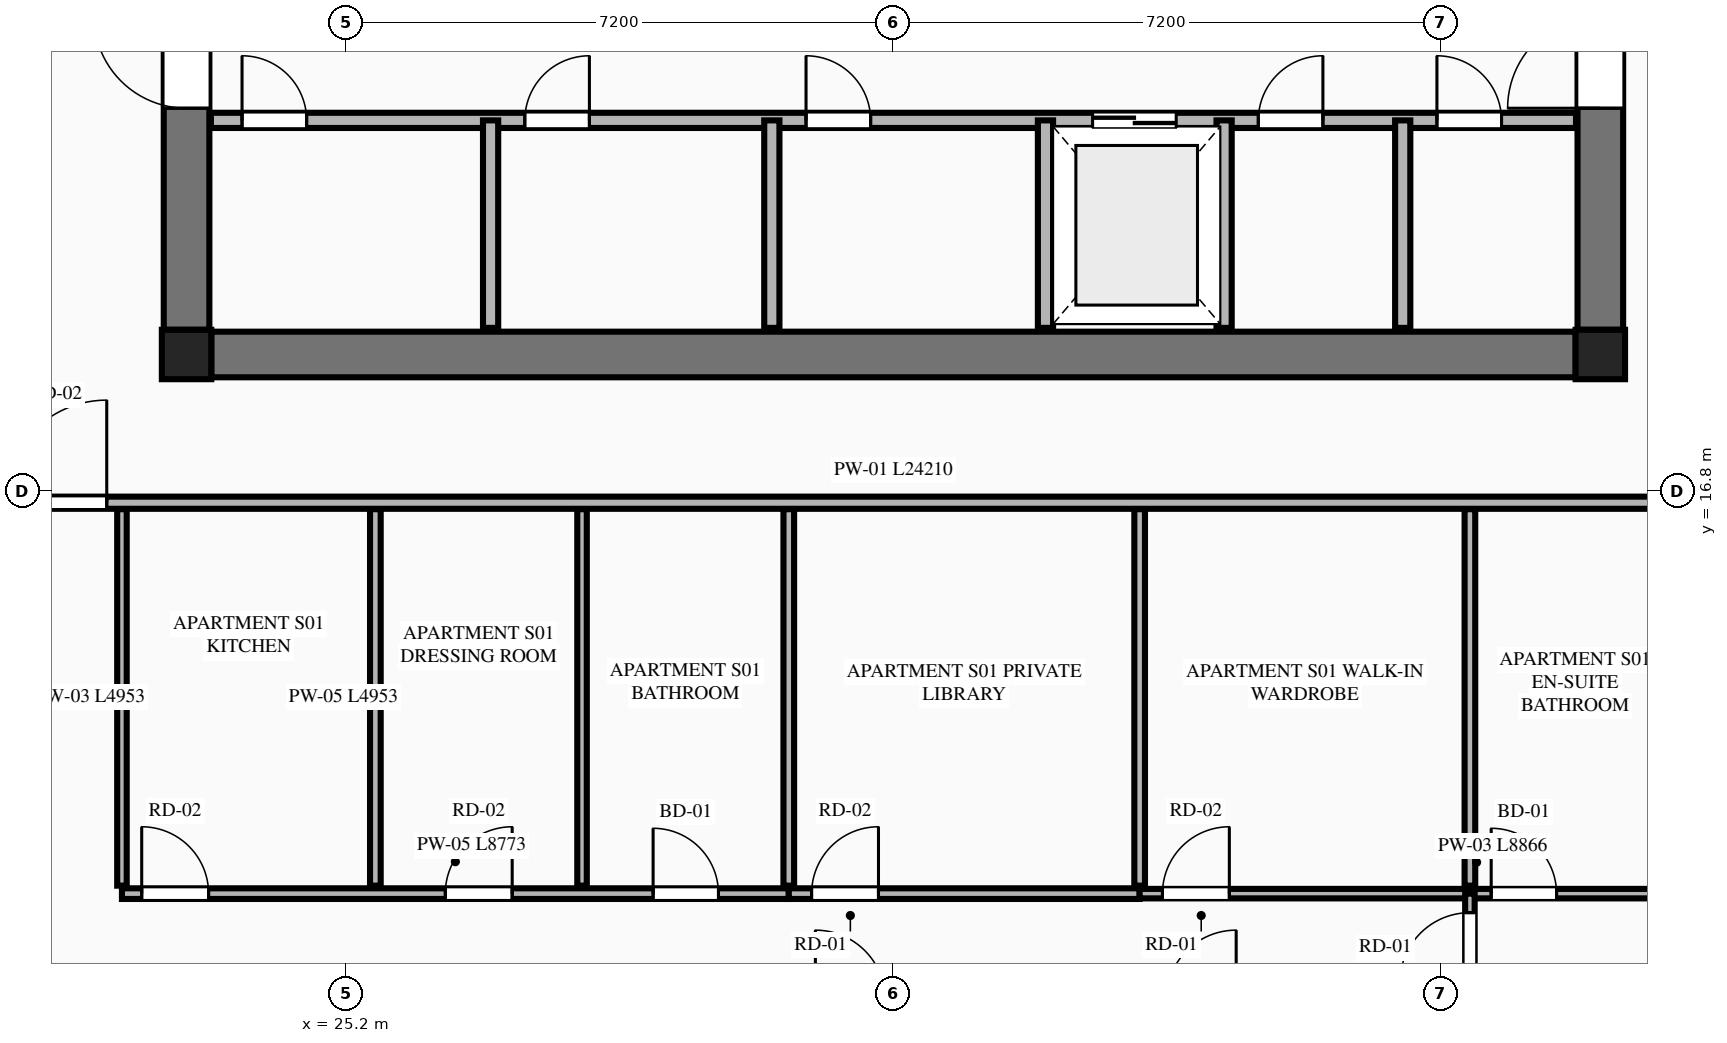
"""IFC4 building model, lengths in metres.
Left out: names, types, materials, properties, quantities, classifications, styles, units other than length and angle.
Written with IfcOpenShell. Run it as: python <this file> out.ifc"""

import sys

from ifc_helpers import new_model, si_unit, direction, frame, frame_2d, origin, origin_2d, place, context, subcontext, project, spatial, rectangle, extrude, element, fill, save


model = new_model("IFC4")
c1 = context("Model", 3, precision=1e-05, world=origin(), true_north=direction((0.0, 1.0)))
c2 = subcontext(c1, "Body", "Model", "MODEL_VIEW")
j1 = project(units=[si_unit("LENGTHUNIT", "METRE"), si_unit("PLANEANGLEUNIT", "RADIAN")], contexts=[c1])
p1 = place(None, origin())
s1 = spatial("IfcSite", under=j1, at=p1, CompositionType="ELEMENT")
p2 = place(p1, origin())
s2 = spatial("IfcBuilding", under=s1, at=p2, CompositionType="ELEMENT")
p3 = place(p2, frame((0.0, 0.0, 164.15)))
s3 = spatial("IfcBuildingStorey", under=s2, at=p3, CompositionType="ELEMENT", Elevation=164.15)
for number, where, z_axis, x_axis in (
    (1, (23.1, 18.6, 0.0), (0.0, 0.0, 1.0), (1.0, 0.0, 0.0)),
    (2, (41.7, 18.6, 0.0), (0.0, 0.0, 1.0), (1.0, 0.0, 0.0)),
):
    element("IfcColumn", number, at=place(p3, frame(where, z_axis=z_axis, x_axis=x_axis)), inside=s3, PredefinedType="COLUMN", context=c2, shape_type="SweptSolid", body=[
        extrude(rectangle(XDim=0.65, YDim=0.65, at=origin_2d()), origin(), (0.0, 0.0, 1.0), 3.55),
    ])
p4 = place(p3, frame((23.425, 18.6, 0.0), z_axis=(0.0, 0.0, 1.0), x_axis=(1.0, 0.0, 0.0)))
e3 = element("IfcWall", 3, at=p4, inside=s3, PredefinedType="SHEAR", context=c2, shape_type="SweptSolid", body=[
    extrude(rectangle(XDim=17.95, YDim=0.6, at=frame_2d((8.975, 0.0))), origin(), (0.0, 0.0, 1.0), 3.34),
])
p5 = place(p3, frame((23.1, 18.925, 0.0), z_axis=(0.0, 0.0, 1.0), x_axis=(0.0, 1.0, 0.0)))
e4 = element("IfcWall", 4, at=p5, inside=s3, PredefinedType="SHEAR", context=c2, shape_type="SweptSolid", body=[
    extrude(rectangle(XDim=13.95, YDim=0.6, at=frame_2d((6.975, 0.0))), origin(), (0.0, 0.0, 1.0), 3.34),
])
p6 = place(p5, frame((2.915, 0.0, 0.0)))
e5 = element("IfcOpeningElement", 5, at=p6, cuts=e4, PredefinedType="OPENING", context=c2, shape_type="SweptSolid", body=[
    extrude(rectangle(XDim=1.22, YDim=2.25, at=frame_2d((0.61, 1.125))), frame((0.0, 0.31, 0.0), z_axis=(0.0, -1.0, 0.0), x_axis=(1.0, 0.0, 0.0)), (0.0, 0.0, 1.0), 0.62),
])
p7 = place(p3, frame((41.7, 18.925, 0.0), z_axis=(0.0, 0.0, 1.0), x_axis=(0.0, 1.0, 0.0)))
e6 = element("IfcWall", 6, at=p7, inside=s3, PredefinedType="SHEAR", context=c2, shape_type="SweptSolid", body=[
    extrude(rectangle(XDim=13.95, YDim=0.6, at=frame_2d((6.975, 0.0))), origin(), (0.0, 0.0, 1.0), 3.34),
])
p8 = place(p7, frame((2.915, 0.0, 0.0)))
e7 = element("IfcOpeningElement", 7, at=p8, cuts=e6, PredefinedType="OPENING", context=c2, shape_type="SweptSolid", body=[
    extrude(rectangle(XDim=1.22, YDim=2.25, at=frame_2d((0.61, 1.125))), frame((0.0, 0.31, 0.0), z_axis=(0.0, -1.0, 0.0), x_axis=(1.0, 0.0, 0.0)), (0.0, 0.0, 1.0), 0.62),
])
p9 = place(p3, frame((23.42, 21.68, 0.0), z_axis=(0.0, 0.0, 1.0), x_axis=(1.0, 0.0, 0.0)))
e8 = element("IfcWall", 8, at=p9, inside=s3, PredefinedType="PLUMBINGWALL", context=c2, shape_type="SweptSolid", body=[
    extrude(rectangle(XDim=17.96, YDim=0.2, at=frame_2d((8.98, 0.0))), origin(), (0.0, 0.0, 1.0), 3.34),
])
p10 = place(p9, frame((11.6, 0.0, 0.0)))
e9 = element("IfcOpeningElement", 9, at=p10, cuts=e8, PredefinedType="OPENING", context=c2, shape_type="SweptSolid", body=[
    extrude(rectangle(XDim=1.1, YDim=2.2, at=frame_2d((0.55, 1.1))), frame((0.0, 0.11, 0.0), z_axis=(0.0, -1.0, 0.0), x_axis=(1.0, 0.0, 0.0)), (0.0, 0.0, 1.0), 0.22),
])
p11 = place(p9, frame((0.41, 0.0, 0.0)))
e10 = element("IfcOpeningElement", 10, at=p11, cuts=e8, PredefinedType="OPENING", context=c2, shape_type="SweptSolid", body=[
    extrude(rectangle(XDim=0.85, YDim=2.05, at=frame_2d((0.425, 1.025))), frame((0.0, 0.11, 0.0), z_axis=(0.0, -1.0, 0.0), x_axis=(1.0, 0.0, 0.0)), (0.0, 0.0, 1.0), 0.22),
])
p12 = place(p9, frame((4.13, 0.0, 0.0)))
e11 = element("IfcOpeningElement", 11, at=p12, cuts=e8, PredefinedType="OPENING", context=c2, shape_type="SweptSolid", body=[
    extrude(rectangle(XDim=0.85, YDim=2.05, at=frame_2d((0.425, 1.025))), frame((0.0, 0.11, 0.0), z_axis=(0.0, -1.0, 0.0), x_axis=(1.0, 0.0, 0.0)), (0.0, 0.0, 1.0), 0.22),
])
p13 = place(p9, frame((7.83, 0.0, 0.0)))
e12 = element("IfcOpeningElement", 12, at=p13, cuts=e8, PredefinedType="OPENING", context=c2, shape_type="SweptSolid", body=[
    extrude(rectangle(XDim=0.85, YDim=2.05, at=frame_2d((0.425, 1.025))), frame((0.0, 0.11, 0.0), z_axis=(0.0, -1.0, 0.0), x_axis=(1.0, 0.0, 0.0)), (0.0, 0.0, 1.0), 0.22),
])
p14 = place(p9, frame((13.78, 0.0, 0.0)))
e13 = element("IfcOpeningElement", 13, at=p14, cuts=e8, PredefinedType="OPENING", context=c2, shape_type="SweptSolid", body=[
    extrude(rectangle(XDim=0.85, YDim=2.05, at=frame_2d((0.425, 1.025))), frame((0.0, 0.11, 0.0), z_axis=(0.0, -1.0, 0.0), x_axis=(1.0, 0.0, 0.0)), (0.0, 0.0, 1.0), 0.22),
])
p15 = place(p9, frame((16.13, 0.0, 0.0)))
e14 = element("IfcOpeningElement", 14, at=p15, cuts=e8, PredefinedType="OPENING", context=c2, shape_type="SweptSolid", body=[
    extrude(rectangle(XDim=0.85, YDim=2.05, at=frame_2d((0.425, 1.025))), frame((0.0, 0.11, 0.0), z_axis=(0.0, -1.0, 0.0), x_axis=(1.0, 0.0, 0.0)), (0.0, 0.0, 1.0), 0.22),
])
for number, where, z_axis, x_axis in (
    (15, (34.4, 18.95, 0.0), (0.0, 0.0, 1.0), (0.0, 1.0, 0.0)),
    (16, (36.75, 18.95, 0.0), (0.0, 0.0, 1.0), (0.0, 1.0, 0.0)),
    (17, (27.1, 18.95, 0.0), (0.0, 0.0, 1.0), (0.0, 1.0, 0.0)),
    (18, (30.8, 18.95, 0.0), (0.0, 0.0, 1.0), (0.0, 1.0, 0.0)),
    (19, (39.1, 18.95, 0.0), (0.0, 0.0, 1.0), (0.0, 1.0, 0.0)),
):
    element("IfcWall", number, at=place(p3, frame(where, z_axis=z_axis, x_axis=x_axis)), inside=s3, PredefinedType="PLUMBINGWALL", context=c2, shape_type="SweptSolid", body=[
        extrude(rectangle(XDim=2.73, YDim=0.2, at=frame_2d((1.365, 0.0))), origin(), (0.0, 0.0, 1.0), 3.34),
    ])
p16 = place(p3, frame((20.295, 16.65, 0.0), z_axis=(0.0, 0.0, 1.0), x_axis=(1.0, 0.0, 0.0)))
e20 = element("IfcWall", 20, at=p16, inside=s3, PredefinedType="PARTITIONING", context=c2, shape_type="SweptSolid", body=[
    extrude(rectangle(XDim=24.21, YDim=0.16, at=frame_2d((12.105, 0.0))), origin(), (0.0, 0.0, 1.0), 3.34),
])
p17 = place(p16, frame((0.405, 0.0, 0.0)))
e21 = element("IfcOpeningElement", 21, at=p17, cuts=e20, PredefinedType="OPENING", context=c2, shape_type="SweptSolid", body=[
    extrude(rectangle(XDim=1.35, YDim=2.35, at=frame_2d((0.675, 1.175))), frame((0.0, 0.09, 0.0), z_axis=(0.0, -1.0, 0.0), x_axis=(1.0, 0.0, 0.0)), (0.0, 0.0, 1.0), 0.18),
])
p18 = place(p3, frame((22.25, 11.612, 0.0), z_axis=(0.0, 0.0, 1.0), x_axis=(0.0, 1.0, 0.0)))
e22 = element("IfcWall", 22, at=p18, inside=s3, PredefinedType="PARTITIONING", context=c2, shape_type="SweptSolid", body=[
    extrude(rectangle(XDim=4.953, YDim=0.125, at=frame_2d((2.477, 0.0))), origin(), (0.0, 0.0, 1.0), 2.722),
])
p19 = place(p3, frame((22.25, 11.507, 0.0), z_axis=(0.0, 0.0, 1.0), x_axis=(1.0, 0.0, 0.0)))
e23 = element("IfcWall", 23, at=p19, inside=s3, PredefinedType="PLUMBINGWALL", context=c2, shape_type="SweptSolid", body=[
    extrude(rectangle(XDim=8.773, YDim=0.14, at=frame_2d((4.386, 0.0))), origin(), (0.0, 0.0, 1.0), 3.34),
])
p20 = place(p19, frame((6.988, 0.0, 0.0)))
e24 = element("IfcOpeningElement", 24, at=p20, cuts=e23, PredefinedType="OPENING", context=c2, shape_type="SweptSolid", body=[
    extrude(rectangle(XDim=0.86, YDim=2.1, at=frame_2d((0.43, 1.05))), frame((0.0, 0.08, 0.0), z_axis=(0.0, -1.0, 0.0), x_axis=(1.0, 0.0, 0.0)), (0.0, 0.0, 1.0), 0.16),
])
p21 = place(p19, frame((0.26, 0.0, 0.0)))
e25 = element("IfcOpeningElement", 25, at=p21, cuts=e23, PredefinedType="OPENING", context=c2, shape_type="SweptSolid", body=[
    extrude(rectangle(XDim=0.88, YDim=2.15, at=frame_2d((0.44, 1.075))), frame((0.0, 0.08, 0.0), z_axis=(0.0, -1.0, 0.0), x_axis=(1.0, 0.0, 0.0)), (0.0, 0.0, 1.0), 0.16),
])
p22 = place(p19, frame((4.254, 0.0, 0.0)))
e26 = element("IfcOpeningElement", 26, at=p22, cuts=e23, PredefinedType="OPENING", context=c2, shape_type="SweptSolid", body=[
    extrude(rectangle(XDim=0.88, YDim=2.15, at=frame_2d((0.44, 1.075))), frame((0.0, 0.08, 0.0), z_axis=(0.0, -1.0, 0.0), x_axis=(1.0, 0.0, 0.0)), (0.0, 0.0, 1.0), 0.16),
])
p23 = place(p3, frame((31.023, 11.507, 0.0), z_axis=(0.0, 0.0, 1.0), x_axis=(1.0, 0.0, 0.0)))
e27 = element("IfcWall", 27, at=p23, inside=s3, PredefinedType="PLUMBINGWALL", context=c2, shape_type="SweptSolid", body=[
    extrude(rectangle(XDim=4.616, YDim=0.14, at=frame_2d((2.308, 0.0))), origin(), (0.0, 0.0, 1.0), 3.34),
])
p24 = place(p23, frame((0.3, 0.0, 0.0)))
e28 = element("IfcOpeningElement", 28, at=p24, cuts=e27, PredefinedType="OPENING", context=c2, shape_type="SweptSolid", body=[
    extrude(rectangle(XDim=0.88, YDim=2.15, at=frame_2d((0.44, 1.075))), frame((0.0, 0.08, 0.0), z_axis=(0.0, -1.0, 0.0), x_axis=(1.0, 0.0, 0.0)), (0.0, 0.0, 1.0), 0.16),
])
p25 = place(p3, frame((35.639, 11.507, 0.0), z_axis=(0.0, 0.0, 1.0), x_axis=(1.0, 0.0, 0.0)))
e29 = element("IfcWall", 29, at=p25, inside=s3, PredefinedType="PARTITIONING", context=c2, shape_type="SweptSolid", body=[
    extrude(rectangle(XDim=8.866, YDim=0.125, at=frame_2d((4.433, 0.0))), origin(), (0.0, 0.0, 1.0), 3.34),
])
p26 = place(p25, frame((4.625, 0.0, 0.0)))
e30 = element("IfcOpeningElement", 30, at=p26, cuts=e29, PredefinedType="OPENING", context=c2, shape_type="SweptSolid", body=[
    extrude(rectangle(XDim=0.86, YDim=2.1, at=frame_2d((0.43, 1.05))), frame((0.0, 0.073, 0.0), z_axis=(0.0, -1.0, 0.0), x_axis=(1.0, 0.0, 0.0)), (0.0, 0.0, 1.0), 0.145),
])
p27 = place(p25, frame((7.394, 0.0, 0.0)))
e31 = element("IfcOpeningElement", 31, at=p27, cuts=e29, PredefinedType="OPENING", context=c2, shape_type="SweptSolid", body=[
    extrude(rectangle(XDim=0.88, YDim=2.15, at=frame_2d((0.44, 1.075))), frame((0.0, 0.073, 0.0), z_axis=(0.0, -1.0, 0.0), x_axis=(1.0, 0.0, 0.0)), (0.0, 0.0, 1.0), 0.145),
])
p28 = place(p25, frame((0.3, 0.0, 0.0)))
e32 = element("IfcOpeningElement", 32, at=p28, cuts=e29, PredefinedType="OPENING", context=c2, shape_type="SweptSolid", body=[
    extrude(rectangle(XDim=0.88, YDim=2.15, at=frame_2d((0.44, 1.075))), frame((0.0, 0.073, 0.0), z_axis=(0.0, -1.0, 0.0), x_axis=(1.0, 0.0, 0.0)), (0.0, 0.0, 1.0), 0.145),
])
p29 = place(p3, frame((25.584, 11.612, 0.0), z_axis=(0.0, 0.0, 1.0), x_axis=(0.0, 1.0, 0.0)))
e33 = element("IfcWall", 33, at=p29, inside=s3, PredefinedType="PLUMBINGWALL", context=c2, shape_type="SweptSolid", body=[
    extrude(rectangle(XDim=4.953, YDim=0.14, at=frame_2d((2.477, 0.0))), origin(), (0.0, 0.0, 1.0), 3.34),
])
p30 = place(p3, frame((28.303, 11.612, 0.0), z_axis=(0.0, 0.0, 1.0), x_axis=(0.0, 1.0, 0.0)))
e34 = element("IfcWall", 34, at=p30, inside=s3, PredefinedType="PARTITIONING", context=c2, shape_type="SweptSolid", body=[
    extrude(rectangle(XDim=4.953, YDim=0.125, at=frame_2d((2.477, 0.0))), origin(), (0.0, 0.0, 1.0), 3.34),
])
p31 = place(p3, frame((39.984, 10.177, 0.0), z_axis=(0.0, 0.0, 1.0), x_axis=(0.0, 1.0, 0.0)))
e35 = element("IfcWall", 35, at=p31, inside=s3, PredefinedType="PARTITIONING", context=c2, shape_type="SweptSolid", body=[
    extrude(rectangle(XDim=1.33, YDim=0.125, at=frame_2d((0.665, 0.0))), origin(), (0.0, 0.0, 1.0), 3.34),
])
p32 = place(p31, frame((0.16, 0.0, 0.0)))
e36 = element("IfcOpeningElement", 36, at=p32, cuts=e35, PredefinedType="OPENING", context=c2, shape_type="SweptSolid", body=[
    extrude(rectangle(XDim=0.92, YDim=2.15, at=frame_2d((0.46, 1.075))), frame((0.0, 0.073, 0.0), z_axis=(0.0, -1.0, 0.0), x_axis=(1.0, 0.0, 0.0)), (0.0, 0.0, 1.0), 0.145),
])
for number, where, z_axis, x_axis in (
    (37, (31.023, 11.612, 0.0), (0.0, 0.0, 1.0), (0.0, 1.0, 0.0)),
    (38, (35.639, 11.612, 0.0), (0.0, 0.0, 1.0), (0.0, 1.0, 0.0)),
    (39, (39.984, 11.612, 0.0), (0.0, 0.0, 1.0), (0.0, 1.0, 0.0)),
):
    element("IfcWall", number, at=place(p3, frame(where, z_axis=z_axis, x_axis=x_axis)), inside=s3, PredefinedType="PLUMBINGWALL", context=c2, shape_type="SweptSolid", body=[
        extrude(rectangle(XDim=4.953, YDim=0.14, at=frame_2d((2.477, 0.0))), origin(), (0.0, 0.0, 1.0), 3.34),
    ])
p33 = place(p6, origin())
e40 = element("IfcDoor", 40, at=p33, inside=s3, OperationType="SINGLE_SWING_RIGHT", PredefinedType="DOOR", context=c2, shape_type="SweptSolid", body=[
    extrude(rectangle(XDim=1.22, YDim=2.25, at=frame_2d((0.61, 1.125))), frame((0.0, 0.025, 0.0), z_axis=(0.0, -1.0, 0.0), x_axis=(1.0, 0.0, 0.0)), (0.0, 0.0, 1.0), 0.05),
])
fill(e5, e40)
p34 = place(p8, origin())
e41 = element("IfcDoor", 41, at=p34, inside=s3, OperationType="SINGLE_SWING_LEFT", PredefinedType="DOOR", context=c2, shape_type="SweptSolid", body=[
    extrude(rectangle(XDim=1.22, YDim=2.25, at=frame_2d((0.61, 1.125))), frame((0.0, 0.025, 0.0), z_axis=(0.0, -1.0, 0.0), x_axis=(1.0, 0.0, 0.0)), (0.0, 0.0, 1.0), 0.05),
])
fill(e7, e41)
p35 = place(p10, origin())
e42 = element("IfcDoor", 42, at=p35, inside=s3, OperationType="DOUBLE_DOOR_SLIDING", PredefinedType="DOOR", context=c2, shape_type="SweptSolid", body=[
    extrude(rectangle(XDim=1.1, YDim=2.2, at=frame_2d((0.55, 1.1))), frame((0.0, 0.025, 0.0), z_axis=(0.0, -1.0, 0.0), x_axis=(1.0, 0.0, 0.0)), (0.0, 0.0, 1.0), 0.05),
])
fill(e9, e42)
p36 = place(p11, origin())
e43 = element("IfcDoor", 43, at=p36, inside=s3, OperationType="SINGLE_SWING_LEFT", PredefinedType="DOOR", context=c2, shape_type="SweptSolid", body=[
    extrude(rectangle(XDim=0.85, YDim=2.05, at=frame_2d((0.425, 1.025))), frame((0.0, 0.025, 0.0), z_axis=(0.0, -1.0, 0.0), x_axis=(1.0, 0.0, 0.0)), (0.0, 0.0, 1.0), 0.05),
])
fill(e10, e43)
p37 = place(p12, origin())
e44 = element("IfcDoor", 44, at=p37, inside=s3, OperationType="SINGLE_SWING_RIGHT", PredefinedType="DOOR", context=c2, shape_type="SweptSolid", body=[
    extrude(rectangle(XDim=0.85, YDim=2.05, at=frame_2d((0.425, 1.025))), frame((0.0, 0.025, 0.0), z_axis=(0.0, -1.0, 0.0), x_axis=(1.0, 0.0, 0.0)), (0.0, 0.0, 1.0), 0.05),
])
fill(e11, e44)
p38 = place(p13, origin())
e45 = element("IfcDoor", 45, at=p38, inside=s3, OperationType="SINGLE_SWING_LEFT", PredefinedType="DOOR", context=c2, shape_type="SweptSolid", body=[
    extrude(rectangle(XDim=0.85, YDim=2.05, at=frame_2d((0.425, 1.025))), frame((0.0, 0.025, 0.0), z_axis=(0.0, -1.0, 0.0), x_axis=(1.0, 0.0, 0.0)), (0.0, 0.0, 1.0), 0.05),
])
fill(e12, e45)
p39 = place(p14, origin())
e46 = element("IfcDoor", 46, at=p39, inside=s3, OperationType="SINGLE_SWING_RIGHT", PredefinedType="DOOR", context=c2, shape_type="SweptSolid", body=[
    extrude(rectangle(XDim=0.85, YDim=2.05, at=frame_2d((0.425, 1.025))), frame((0.0, 0.025, 0.0), z_axis=(0.0, -1.0, 0.0), x_axis=(1.0, 0.0, 0.0)), (0.0, 0.0, 1.0), 0.05),
])
fill(e13, e46)
p40 = place(p15, origin())
e47 = element("IfcDoor", 47, at=p40, inside=s3, OperationType="SINGLE_SWING_LEFT", PredefinedType="DOOR", context=c2, shape_type="SweptSolid", body=[
    extrude(rectangle(XDim=0.85, YDim=2.05, at=frame_2d((0.425, 1.025))), frame((0.0, 0.025, 0.0), z_axis=(0.0, -1.0, 0.0), x_axis=(1.0, 0.0, 0.0)), (0.0, 0.0, 1.0), 0.05),
])
fill(e14, e47)
p41 = place(p20, origin())
e48 = element("IfcDoor", 48, at=p41, inside=s3, OperationType="SINGLE_SWING_LEFT", PredefinedType="DOOR", context=c2, shape_type="SweptSolid", body=[
    extrude(rectangle(XDim=0.86, YDim=2.1, at=frame_2d((0.43, 1.05))), frame((0.0, 0.025, 0.0), z_axis=(0.0, -1.0, 0.0), x_axis=(1.0, 0.0, 0.0)), (0.0, 0.0, 1.0), 0.05),
])
fill(e24, e48)
p42 = place(p26, origin())
e49 = element("IfcDoor", 49, at=p42, inside=s3, OperationType="SINGLE_SWING_LEFT", PredefinedType="DOOR", context=c2, shape_type="SweptSolid", body=[
    extrude(rectangle(XDim=0.86, YDim=2.1, at=frame_2d((0.43, 1.05))), frame((0.0, 0.025, 0.0), z_axis=(0.0, -1.0, 0.0), x_axis=(1.0, 0.0, 0.0)), (0.0, 0.0, 1.0), 0.05),
])
fill(e30, e49)
p43 = place(p17, origin())
e50 = element("IfcDoor", 50, at=p43, inside=s3, OperationType="SINGLE_SWING_RIGHT", PredefinedType="DOOR", context=c2, shape_type="SweptSolid", body=[
    extrude(rectangle(XDim=1.35, YDim=2.35, at=frame_2d((0.675, 1.175))), frame((0.0, 0.025, 0.0), z_axis=(0.0, -1.0, 0.0), x_axis=(1.0, 0.0, 0.0)), (0.0, 0.0, 1.0), 0.05),
])
fill(e21, e50)
p44 = place(p21, origin())
e51 = element("IfcDoor", 51, at=p44, inside=s3, OperationType="SINGLE_SWING_LEFT", PredefinedType="DOOR", context=c2, shape_type="SweptSolid", body=[
    extrude(rectangle(XDim=0.88, YDim=2.15, at=frame_2d((0.44, 1.075))), frame((0.0, 0.025, 0.0), z_axis=(0.0, -1.0, 0.0), x_axis=(1.0, 0.0, 0.0)), (0.0, 0.0, 1.0), 0.05),
])
fill(e25, e51)
p45 = place(p22, origin())
e52 = element("IfcDoor", 52, at=p45, inside=s3, OperationType="SINGLE_SWING_RIGHT", PredefinedType="DOOR", context=c2, shape_type="SweptSolid", body=[
    extrude(rectangle(XDim=0.88, YDim=2.15, at=frame_2d((0.44, 1.075))), frame((0.0, 0.025, 0.0), z_axis=(0.0, -1.0, 0.0), x_axis=(1.0, 0.0, 0.0)), (0.0, 0.0, 1.0), 0.05),
])
fill(e26, e52)
p46 = place(p24, origin())
e53 = element("IfcDoor", 53, at=p46, inside=s3, OperationType="SINGLE_SWING_RIGHT", PredefinedType="DOOR", context=c2, shape_type="SweptSolid", body=[
    extrude(rectangle(XDim=0.88, YDim=2.15, at=frame_2d((0.44, 1.075))), frame((0.0, 0.025, 0.0), z_axis=(0.0, -1.0, 0.0), x_axis=(1.0, 0.0, 0.0)), (0.0, 0.0, 1.0), 0.05),
])
fill(e28, e53)
p47 = place(p32, origin())
e54 = element("IfcDoor", 54, at=p47, inside=s3, OperationType="SINGLE_SWING_LEFT", PredefinedType="DOOR", context=c2, shape_type="SweptSolid", body=[
    extrude(rectangle(XDim=0.92, YDim=2.15, at=frame_2d((0.46, 1.075))), frame((0.0, 0.025, 0.0), z_axis=(0.0, -1.0, 0.0), x_axis=(1.0, 0.0, 0.0)), (0.0, 0.0, 1.0), 0.05),
])
fill(e36, e54)
p48 = place(p28, origin())
e55 = element("IfcDoor", 55, at=p48, inside=s3, OperationType="SINGLE_SWING_RIGHT", PredefinedType="DOOR", context=c2, shape_type="SweptSolid", body=[
    extrude(rectangle(XDim=0.88, YDim=2.15, at=frame_2d((0.44, 1.075))), frame((0.0, 0.025, 0.0), z_axis=(0.0, -1.0, 0.0), x_axis=(1.0, 0.0, 0.0)), (0.0, 0.0, 1.0), 0.05),
])
fill(e32, e55)
save(model, sys.argv[1])
